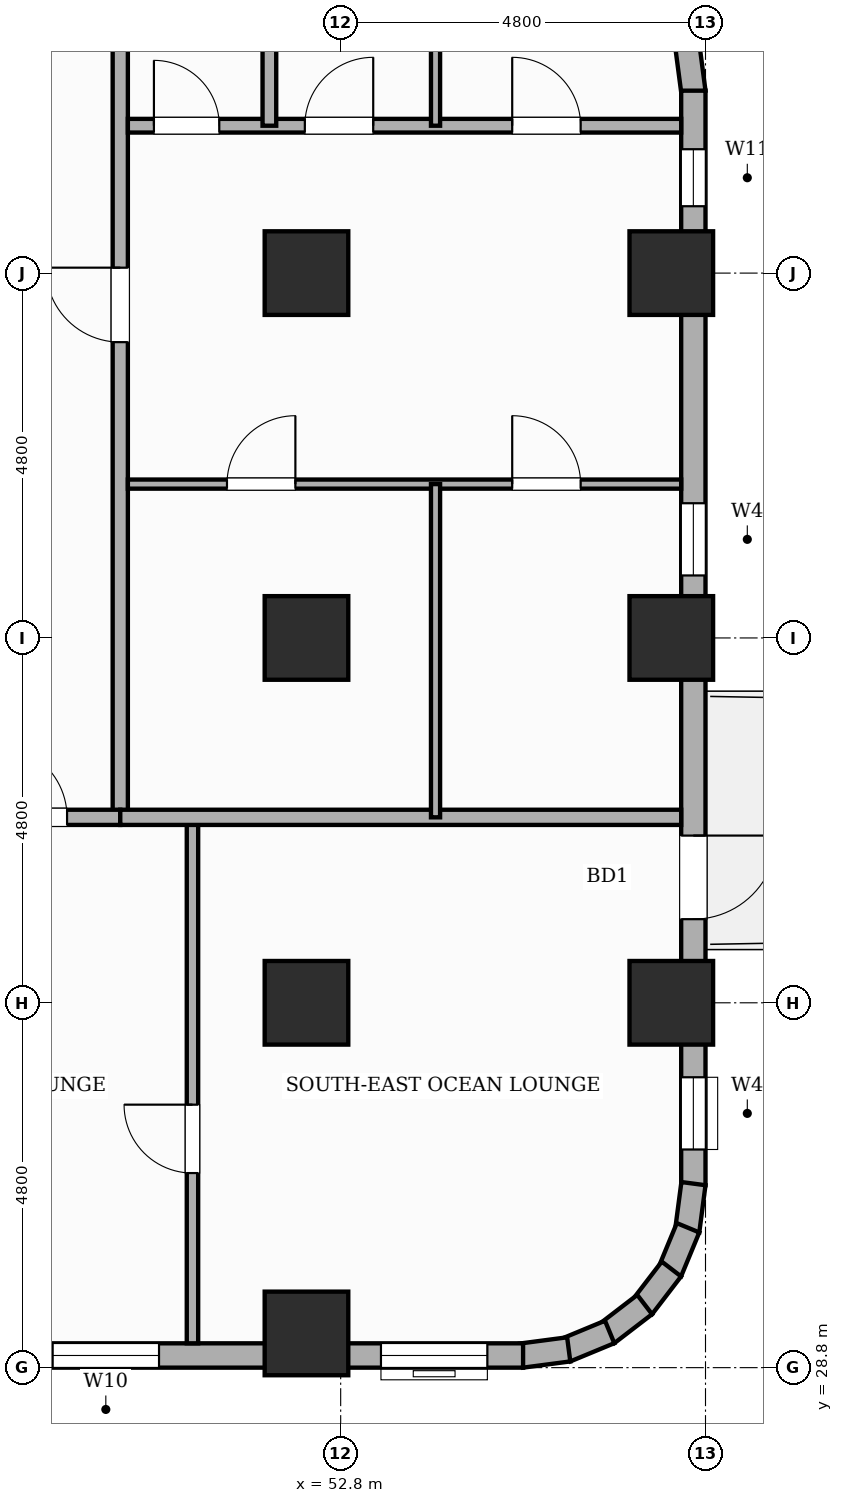
"""IFC4 building model, lengths in metres.
Left out: names, types, materials, properties, quantities, classifications, styles, units other than length and angle.
Written with IfcOpenShell. Run it as: python <this file> out.ifc"""

import sys

from ifc_helpers import new_model, si_unit, direction, frame, frame_2d, origin, origin_2d, place, context, subcontext, project, spatial, rectangle, extrude, element, fill, save


model = new_model("IFC4")
c1 = context("Model", 3, precision=1e-05, world=origin(), true_north=direction((0.0, 1.0)))
c2 = subcontext(c1, "Body", "Model", "MODEL_VIEW")
j1 = project(units=[si_unit("LENGTHUNIT", "METRE"), si_unit("PLANEANGLEUNIT", "RADIAN")], contexts=[c1])
p1 = place(None, origin())
s1 = spatial("IfcSite", under=j1, at=p1, CompositionType="ELEMENT")
p2 = place(p1, origin())
s2 = spatial("IfcBuilding", under=s1, at=p2, CompositionType="ELEMENT")
p3 = place(p2, frame((0.0, 0.0, 46.6)))
s3 = spatial("IfcBuildingStorey", under=s2, at=p3, CompositionType="ELEMENT", Elevation=46.6)
for number, where, z_axis, x_axis in (
    (1, (52.35, 29.25, 0.0), (0.0, 0.0, 1.0), (1.0, 0.0, 0.0)),
    (2, (52.35, 33.6, 0.0), (0.0, 0.0, 1.0), (1.0, 0.0, 0.0)),
    (3, (52.35, 38.4, 0.0), (0.0, 0.0, 1.0), (1.0, 0.0, 0.0)),
    (4, (52.35, 43.2, 0.0), (0.0, 0.0, 1.0), (1.0, 0.0, 0.0)),
    (5, (57.15, 33.6, 0.0), (0.0, 0.0, 1.0), (1.0, 0.0, 0.0)),
    (6, (57.15, 38.4, 0.0), (0.0, 0.0, 1.0), (1.0, 0.0, 0.0)),
    (7, (57.15, 43.2, 0.0), (0.0, 0.0, 1.0), (1.0, 0.0, 0.0)),
):
    element("IfcColumn", number, at=place(p3, frame(where, z_axis=z_axis, x_axis=x_axis)), inside=s3, PredefinedType="COLUMN", context=c2, shape_type="SweptSolid", body=[
        extrude(rectangle(XDim=1.1, YDim=1.1, at=origin_2d()), origin(), (0.0, 0.0, 1.0), 3.6),
    ])
for number, where, z_axis, x_axis in (
    (8, (57.131, 46.739, 0.0), (0.0, 0.0, 1.0), (0.383, -0.924, 0.0)),
    (9, (57.36, 46.2, 0.0), (0.0, 0.0, 1.0), (0.131, -0.991, 0.0)),
):
    element("IfcWall", number, at=place(p3, frame(where, z_axis=z_axis, x_axis=x_axis)), inside=s3, PredefinedType="STANDARD", context=c2, shape_type="SweptSolid", body=[
        extrude(rectangle(XDim=0.626, YDim=0.32, at=frame_2d((0.313, 0.0))), origin(), (0.0, 0.0, 1.0), 3.35),
    ])
p4 = place(p3, frame((57.44, 45.6, 0.0), z_axis=(0.0, 0.0, 1.0), x_axis=(0.0, -1.0, 0.0)))
e10 = element("IfcWall", 10, at=p4, inside=s3, PredefinedType="STANDARD", context=c2, shape_type="SweptSolid", body=[
    extrude(rectangle(XDim=14.4, YDim=0.32, at=frame_2d((7.2, 0.0))), origin(), (0.0, 0.0, 1.0), 2.53),
])
p5 = place(p4, frame((9.8, 0.0, 0.0)))
e11 = element("IfcOpeningElement", 11, at=p5, cuts=e10, PredefinedType="OPENING", context=c2, shape_type="SweptSolid", body=[
    extrude(rectangle(XDim=1.1, YDim=2.15, at=frame_2d((0.55, 1.075))), frame((0.0, 0.17, 0.0), z_axis=(0.0, -1.0, 0.0), x_axis=(1.0, 0.0, 0.0)), (0.0, 0.0, 1.0), 0.34),
])
p6 = place(p4, frame((5.428, 0.0, 0.45)))
e12 = element("IfcOpeningElement", 12, at=p6, cuts=e10, PredefinedType="OPENING", context=c2, shape_type="SweptSolid", body=[
    extrude(rectangle(XDim=0.95, YDim=1.8, at=frame_2d((0.475, 0.9))), frame((0.0, 0.17, 0.0), z_axis=(0.0, -1.0, 0.0), x_axis=(1.0, 0.0, 0.0)), (0.0, 0.0, 1.0), 0.34),
])
p7 = place(p4, frame((12.98, 0.0, 0.45)))
e13 = element("IfcOpeningElement", 13, at=p7, cuts=e10, PredefinedType="OPENING", context=c2, shape_type="SweptSolid", body=[
    extrude(rectangle(XDim=0.95, YDim=1.8, at=frame_2d((0.475, 0.9))), frame((0.0, 0.17, 0.0), z_axis=(0.0, -1.0, 0.0), x_axis=(1.0, 0.0, 0.0)), (0.0, 0.0, 1.0), 0.34),
])
p8 = place(p4, frame((0.771, 0.0, 0.45)))
e14 = element("IfcOpeningElement", 14, at=p8, cuts=e10, PredefinedType="OPENING", context=c2, shape_type="SweptSolid", body=[
    extrude(rectangle(XDim=0.75, YDim=1.8, at=frame_2d((0.375, 0.9))), frame((0.0, 0.17, 0.0), z_axis=(0.0, -1.0, 0.0), x_axis=(1.0, 0.0, 0.0)), (0.0, 0.0, 1.0), 0.34),
])
p9 = place(p3, frame((57.441, 31.221, 0.0), z_axis=(0.0, 0.0, 1.0), x_axis=(-0.130504898859, -0.991447664465, 0.0)))
e15 = element("IfcWall", 15, at=p9, inside=s3, PredefinedType="STANDARD", context=c2, shape_type="SweptSolid", body=[
    extrude(rectangle(XDim=0.627, YDim=0.32, at=frame_2d((0.313, 0.0))), origin(), (0.0, 0.0, 1.0), 3.35),
])
p10 = place(p3, frame((57.37, 30.64, 0.0), z_axis=(0.0, 0.0, 1.0), x_axis=(-0.382787856107, -0.923836271867, 0.0)))
e16 = element("IfcWall", 16, at=p10, inside=s3, PredefinedType="STANDARD", context=c2, shape_type="SweptSolid", body=[
    extrude(rectangle(XDim=0.626, YDim=0.32, at=frame_2d((0.313, 0.0))), origin(), (0.0, 0.0, 1.0), 3.35),
])
p11 = place(p3, frame((57.152, 30.097, 0.0), z_axis=(0.0, 0.0, 1.0), x_axis=(-0.608693302629, -0.793405610854, 0.0)))
e17 = element("IfcWall", 17, at=p11, inside=s3, PredefinedType="STANDARD", context=c2, shape_type="SweptSolid", body=[
    extrude(rectangle(XDim=0.626, YDim=0.32, at=frame_2d((0.313, 0.0))), origin(), (0.0, 0.0, 1.0), 3.35),
])
p12 = place(p3, frame((56.8, 29.63, 0.0), z_axis=(0.0, 0.0, 1.0), x_axis=(-0.793361818833, -0.608750379399, 0.0)))
e18 = element("IfcWall", 18, at=p12, inside=s3, PredefinedType="STANDARD", context=c2, shape_type="SweptSolid", body=[
    extrude(rectangle(XDim=0.627, YDim=0.32, at=frame_2d((0.313, 0.0))), origin(), (0.0, 0.0, 1.0), 3.35),
])
for number, where, z_axis, x_axis in (
    (19, (56.339, 29.269, 0.0), (0.0, 0.0, 1.0), (-0.924, -0.383, 0.0)),
    (20, (55.8, 29.04, 0.0), (0.0, 0.0, 1.0), (-0.991, -0.131, 0.0)),
):
    element("IfcWall", number, at=place(p3, frame(where, z_axis=z_axis, x_axis=x_axis)), inside=s3, PredefinedType="STANDARD", context=c2, shape_type="SweptSolid", body=[
        extrude(rectangle(XDim=0.626, YDim=0.32, at=frame_2d((0.313, 0.0))), origin(), (0.0, 0.0, 1.0), 3.35),
    ])
p13 = place(p3, frame((55.2, 28.96, 0.0), z_axis=(0.0, 0.0, 1.0), x_axis=(-1.0, 0.0, 0.0)))
e21 = element("IfcWall", 21, at=p13, inside=s3, PredefinedType="STANDARD", context=c2, shape_type="SweptSolid", body=[
    extrude(rectangle(XDim=28.8, YDim=0.32, at=frame_2d((14.4, 0.0))), origin(), (0.0, 0.0, 1.0), 2.53),
])
p14 = place(p13, frame((27.38, 0.0, 0.45)))
e22 = element("IfcOpeningElement", 22, at=p14, cuts=e21, PredefinedType="OPENING", context=c2, shape_type="SweptSolid", body=[
    extrude(rectangle(XDim=0.95, YDim=1.8, at=frame_2d((0.475, 0.9))), frame((0.0, 0.17, 0.0), z_axis=(0.0, -1.0, 0.0), x_axis=(1.0, 0.0, 0.0)), (0.0, 0.0, 1.0), 0.34),
])
p15 = place(p13, frame((18.815, 0.0, 0.65)))
e23 = element("IfcOpeningElement", 23, at=p15, cuts=e21, PredefinedType="OPENING", context=c2, shape_type="SweptSolid", body=[
    extrude(rectangle(XDim=1.4, YDim=1.1, at=frame_2d((0.7, 0.55))), frame((0.0, 0.17, 0.0), z_axis=(0.0, -1.0, 0.0), x_axis=(1.0, 0.0, 0.0)), (0.0, 0.0, 1.0), 0.34),
])
p16 = place(p13, frame((14.604, 0.0, 0.65)))
e24 = element("IfcOpeningElement", 24, at=p16, cuts=e21, PredefinedType="OPENING", context=c2, shape_type="SweptSolid", body=[
    extrude(rectangle(XDim=1.4, YDim=1.1, at=frame_2d((0.7, 0.55))), frame((0.0, 0.17, 0.0), z_axis=(0.0, -1.0, 0.0), x_axis=(1.0, 0.0, 0.0)), (0.0, 0.0, 1.0), 0.34),
])
p17 = place(p13, frame((4.79, 0.0, 0.65)))
e25 = element("IfcOpeningElement", 25, at=p17, cuts=e21, PredefinedType="OPENING", context=c2, shape_type="SweptSolid", body=[
    extrude(rectangle(XDim=1.4, YDim=1.1, at=frame_2d((0.7, 0.55))), frame((0.0, 0.17, 0.0), z_axis=(0.0, -1.0, 0.0), x_axis=(1.0, 0.0, 0.0)), (0.0, 0.0, 1.0), 0.34),
])
p18 = place(p13, frame((0.47, 0.0, 0.65)))
e26 = element("IfcOpeningElement", 26, at=p18, cuts=e21, PredefinedType="OPENING", context=c2, shape_type="SweptSolid", body=[
    extrude(rectangle(XDim=1.4, YDim=1.1, at=frame_2d((0.7, 0.55))), frame((0.0, 0.17, 0.0), z_axis=(0.0, -1.0, 0.0), x_axis=(1.0, 0.0, 0.0)), (0.0, 0.0, 1.0), 0.34),
])
p19 = place(p13, frame((23.76, 0.0, 0.65)))
e27 = element("IfcOpeningElement", 27, at=p19, cuts=e21, PredefinedType="OPENING", context=c2, shape_type="SweptSolid", body=[
    extrude(rectangle(XDim=1.4, YDim=1.1, at=frame_2d((0.7, 0.55))), frame((0.0, 0.17, 0.0), z_axis=(0.0, -1.0, 0.0), x_axis=(1.0, 0.0, 0.0)), (0.0, 0.0, 1.0), 0.34),
])
p20 = place(p13, frame((12.999, 0.0, 0.45)))
e28 = element("IfcOpeningElement", 28, at=p20, cuts=e21, PredefinedType="OPENING", context=c2, shape_type="SweptSolid", body=[
    extrude(rectangle(XDim=0.95, YDim=1.8, at=frame_2d((0.475, 0.9))), frame((0.0, 0.17, 0.0), z_axis=(0.0, -1.0, 0.0), x_axis=(1.0, 0.0, 0.0)), (0.0, 0.0, 1.0), 0.34),
])
p21 = place(p3, frame((49.9, 36.04, 0.0), z_axis=(0.0, 0.0, 1.0), x_axis=(0.0, 1.0, 0.0)))
e29 = element("IfcWall", 29, at=p21, inside=s3, PredefinedType="PARTITIONING", context=c2, shape_type="SweptSolid", body=[
    extrude(rectangle(XDim=11.64, YDim=0.2, at=frame_2d((5.82, 0.0))), origin(), (0.0, 0.0, 1.0), 3.35),
])
p22 = place(p21, frame((6.251, 0.0, 0.0)))
e30 = element("IfcOpeningElement", 30, at=p22, cuts=e29, PredefinedType="OPENING", context=c2, shape_type="SweptSolid", body=[
    extrude(rectangle(XDim=0.98, YDim=2.18, at=frame_2d((0.49, 1.09))), frame((0.0, 0.11, 0.0), z_axis=(0.0, -1.0, 0.0), x_axis=(1.0, 0.0, 0.0)), (0.0, 0.0, 1.0), 0.22),
])
p23 = place(p3, frame((47.6, 36.04, 0.0), z_axis=(0.0, 0.0, 1.0), x_axis=(1.0, 0.0, 0.0)))
e31 = element("IfcWall", 31, at=p23, inside=s3, PredefinedType="PARTITIONING", context=c2, shape_type="SweptSolid", body=[
    extrude(rectangle(XDim=2.3, YDim=0.2, at=frame_2d((1.15, 0.0))), origin(), (0.0, 0.0, 1.0), 3.35),
])
p24 = place(p23, frame((0.65, 0.0, 0.0)))
e32 = element("IfcOpeningElement", 32, at=p24, cuts=e31, PredefinedType="OPENING", context=c2, shape_type="SweptSolid", body=[
    extrude(rectangle(XDim=0.95, YDim=2.15, at=frame_2d((0.475, 1.075))), frame((0.0, 0.11, 0.0), z_axis=(0.0, -1.0, 0.0), x_axis=(1.0, 0.0, 0.0)), (0.0, 0.0, 1.0), 0.22),
])
p25 = place(p3, frame((50.85, 29.12, 0.0), z_axis=(0.0, 0.0, 1.0), x_axis=(0.0, 1.0, 0.0)))
e33 = element("IfcWall", 33, at=p25, inside=s3, PredefinedType="PARTITIONING", context=c2, shape_type="SweptSolid", body=[
    extrude(rectangle(XDim=6.92, YDim=0.15, at=frame_2d((3.46, 0.0))), origin(), (0.0, 0.0, 1.0), 3.35),
])
p26 = place(p25, frame((2.24, 0.0, 0.0)))
e34 = element("IfcOpeningElement", 34, at=p26, cuts=e33, PredefinedType="OPENING", context=c2, shape_type="SweptSolid", body=[
    extrude(rectangle(XDim=0.9, YDim=2.15, at=frame_2d((0.45, 1.075))), frame((0.0, 0.085, 0.0), z_axis=(0.0, -1.0, 0.0), x_axis=(1.0, 0.0, 0.0)), (0.0, 0.0, 1.0), 0.17),
])
p27 = place(p3, frame((49.9, 36.04, 0.0), z_axis=(0.0, 0.0, 1.0), x_axis=(1.0, 0.0, 0.0)))
e35 = element("IfcWall", 35, at=p27, inside=s3, PredefinedType="SOLIDWALL", context=c2, shape_type="SweptSolid", body=[
    extrude(rectangle(XDim=7.38, YDim=0.2, at=frame_2d((3.69, 0.0))), origin(), (0.0, 0.0, 1.0), 3.35),
])
p28 = place(p3, frame((50.0, 45.139, 0.0), z_axis=(0.0, 0.0, 1.0), x_axis=(1.0, 0.0, 0.0)))
e36 = element("IfcWall", 36, at=p28, inside=s3, PredefinedType="PLUMBINGWALL", context=c2, shape_type="SweptSolid", body=[
    extrude(rectangle(XDim=7.28, YDim=0.18, at=frame_2d((3.64, 0.0))), origin(), (0.0, 0.0, 1.0), 3.35),
])
p29 = place(p28, frame((0.343, 0.0, 0.0)))
e37 = element("IfcOpeningElement", 37, at=p29, cuts=e36, PredefinedType="OPENING", context=c2, shape_type="SweptSolid", body=[
    extrude(rectangle(XDim=0.86, YDim=2.1, at=frame_2d((0.43, 1.05))), frame((0.0, 0.1, 0.0), z_axis=(0.0, -1.0, 0.0), x_axis=(1.0, 0.0, 0.0)), (0.0, 0.0, 1.0), 0.2),
])
p30 = place(p28, frame((2.328, 0.0, 0.0)))
e38 = element("IfcOpeningElement", 38, at=p30, cuts=e36, PredefinedType="OPENING", context=c2, shape_type="SweptSolid", body=[
    extrude(rectangle(XDim=0.9, YDim=2.15, at=frame_2d((0.45, 1.075))), frame((0.0, 0.1, 0.0), z_axis=(0.0, -1.0, 0.0), x_axis=(1.0, 0.0, 0.0)), (0.0, 0.0, 1.0), 0.2),
])
p31 = place(p28, frame((5.057, 0.0, 0.0)))
e39 = element("IfcOpeningElement", 39, at=p31, cuts=e36, PredefinedType="OPENING", context=c2, shape_type="SweptSolid", body=[
    extrude(rectangle(XDim=0.9, YDim=2.15, at=frame_2d((0.45, 1.075))), frame((0.0, 0.1, 0.0), z_axis=(0.0, -1.0, 0.0), x_axis=(1.0, 0.0, 0.0)), (0.0, 0.0, 1.0), 0.2),
])
p32 = place(p3, frame((50.0, 40.424, 0.0), z_axis=(0.0, 0.0, 1.0), x_axis=(1.0, 0.0, 0.0)))
e40 = element("IfcWall", 40, at=p32, inside=s3, PredefinedType="PARTITIONING", context=c2, shape_type="SweptSolid", body=[
    extrude(rectangle(XDim=7.28, YDim=0.12, at=frame_2d((3.64, 0.0))), origin(), (0.0, 0.0, 1.0), 3.35),
])
p33 = place(p32, frame((1.304, 0.0, 0.0)))
e41 = element("IfcOpeningElement", 41, at=p33, cuts=e40, PredefinedType="OPENING", context=c2, shape_type="SweptSolid", body=[
    extrude(rectangle(XDim=0.9, YDim=2.15, at=frame_2d((0.45, 1.075))), frame((0.0, 0.07, 0.0), z_axis=(0.0, -1.0, 0.0), x_axis=(1.0, 0.0, 0.0)), (0.0, 0.0, 1.0), 0.14),
])
p34 = place(p32, frame((5.057, 0.0, 0.0)))
e42 = element("IfcOpeningElement", 42, at=p34, cuts=e40, PredefinedType="OPENING", context=c2, shape_type="SweptSolid", body=[
    extrude(rectangle(XDim=0.9, YDim=2.15, at=frame_2d((0.45, 1.075))), frame((0.0, 0.07, 0.0), z_axis=(0.0, -1.0, 0.0), x_axis=(1.0, 0.0, 0.0)), (0.0, 0.0, 1.0), 0.14),
])
p35 = place(p3, frame((54.048, 36.04, 0.0), z_axis=(0.0, 0.0, 1.0), x_axis=(0.0, 1.0, 0.0)))
e43 = element("IfcWall", 43, at=p35, inside=s3, PredefinedType="PARTITIONING", context=c2, shape_type="SweptSolid", body=[
    extrude(rectangle(XDim=4.384, YDim=0.12, at=frame_2d((2.192, 0.0))), origin(), (0.0, 0.0, 1.0), 3.35),
])
p36 = place(p3, frame((51.862, 45.139, 0.0), z_axis=(0.0, 0.0, 1.0), x_axis=(0.0, 1.0, 0.0)))
e44 = element("IfcWall", 44, at=p36, inside=s3, PredefinedType="PLUMBINGWALL", context=c2, shape_type="SweptSolid", body=[
    extrude(rectangle(XDim=2.541, YDim=0.18, at=frame_2d((1.271, 0.0))), origin(), (0.0, 0.0, 1.0), 3.35),
])
p37 = place(p3, frame((54.048, 45.139, 0.0), z_axis=(0.0, 0.0, 1.0), x_axis=(0.0, 1.0, 0.0)))
e45 = element("IfcWall", 45, at=p37, inside=s3, PredefinedType="PARTITIONING", context=c2, shape_type="SweptSolid", body=[
    extrude(rectangle(XDim=2.541, YDim=0.12, at=frame_2d((1.271, 0.0))), origin(), (0.0, 0.0, 1.0), 3.35),
])
p38 = place(p5, origin())
e46 = element("IfcDoor", 46, at=p38, inside=s3, OperationType="SINGLE_SWING_LEFT", PredefinedType="DOOR", context=c2, shape_type="SweptSolid", body=[
    extrude(rectangle(XDim=1.1, YDim=2.15, at=frame_2d((0.55, 1.075))), frame((0.0, 0.025, 0.0), z_axis=(0.0, -1.0, 0.0), x_axis=(1.0, 0.0, 0.0)), (0.0, 0.0, 1.0), 0.05),
])
fill(e11, e46)
p39 = place(p6, origin())
e47 = element("IfcWindow", 47, at=p39, inside=s3, PartitioningType="SINGLE_PANEL", PredefinedType="WINDOW", context=c2, shape_type="SweptSolid", body=[
    extrude(rectangle(XDim=0.95, YDim=1.8, at=frame_2d((0.475, 0.9))), frame((0.0, 0.03, 0.0), z_axis=(0.0, -1.0, 0.0), x_axis=(1.0, 0.0, 0.0)), (0.0, 0.0, 1.0), 0.06),
])
fill(e12, e47)
p40 = place(p7, origin())
e48 = element("IfcWindow", 48, at=p40, inside=s3, PartitioningType="SINGLE_PANEL", PredefinedType="WINDOW", context=c2, shape_type="SweptSolid", body=[
    extrude(rectangle(XDim=0.95, YDim=1.8, at=frame_2d((0.475, 0.9))), frame((0.0, 0.03, 0.0), z_axis=(0.0, -1.0, 0.0), x_axis=(1.0, 0.0, 0.0)), (0.0, 0.0, 1.0), 0.06),
])
fill(e13, e48)
p41 = place(p8, origin())
e49 = element("IfcWindow", 49, at=p41, inside=s3, PartitioningType="SINGLE_PANEL", PredefinedType="WINDOW", context=c2, shape_type="SweptSolid", body=[
    extrude(rectangle(XDim=0.75, YDim=1.8, at=frame_2d((0.375, 0.9))), frame((0.0, 0.03, 0.0), z_axis=(0.0, -1.0, 0.0), x_axis=(1.0, 0.0, 0.0)), (0.0, 0.0, 1.0), 0.06),
])
fill(e14, e49)
p42 = place(p17, origin())
e50 = element("IfcWindow", 50, at=p42, inside=s3, PartitioningType="SINGLE_PANEL", PredefinedType="WINDOW", context=c2, shape_type="SweptSolid", body=[
    extrude(rectangle(XDim=1.4, YDim=1.1, at=frame_2d((0.7, 0.55))), frame((0.0, 0.03, 0.0), z_axis=(0.0, -1.0, 0.0), x_axis=(1.0, 0.0, 0.0)), (0.0, 0.0, 1.0), 0.06),
])
fill(e25, e50)
p43 = place(p18, origin())
e51 = element("IfcWindow", 51, at=p43, inside=s3, PartitioningType="SINGLE_PANEL", PredefinedType="WINDOW", context=c2, shape_type="SweptSolid", body=[
    extrude(rectangle(XDim=1.4, YDim=1.1, at=frame_2d((0.7, 0.55))), frame((0.0, 0.03, 0.0), z_axis=(0.0, -1.0, 0.0), x_axis=(1.0, 0.0, 0.0)), (0.0, 0.0, 1.0), 0.06),
])
fill(e26, e51)
p44 = place(p24, origin())
e52 = element("IfcDoor", 52, at=p44, inside=s3, OperationType="SINGLE_SWING_LEFT", PredefinedType="DOOR", context=c2, shape_type="SweptSolid", body=[
    extrude(rectangle(XDim=0.95, YDim=2.15, at=frame_2d((0.475, 1.075))), frame((0.0, 0.025, 0.0), z_axis=(0.0, -1.0, 0.0), x_axis=(1.0, 0.0, 0.0)), (0.0, 0.0, 1.0), 0.05),
])
fill(e32, e52)
p45 = place(p26, origin())
e53 = element("IfcDoor", 53, at=p45, inside=s3, OperationType="SINGLE_SWING_RIGHT", PredefinedType="DOOR", context=c2, shape_type="SweptSolid", body=[
    extrude(rectangle(XDim=0.9, YDim=2.15, at=frame_2d((0.45, 1.075))), frame((0.0, 0.025, 0.0), z_axis=(0.0, -1.0, 0.0), x_axis=(1.0, 0.0, 0.0)), (0.0, 0.0, 1.0), 0.05),
])
fill(e34, e53)
p46 = place(p22, origin())
e54 = element("IfcDoor", 54, at=p46, inside=s3, OperationType="SINGLE_SWING_RIGHT", PredefinedType="DOOR", context=c2, shape_type="SweptSolid", body=[
    extrude(rectangle(XDim=0.98, YDim=2.18, at=frame_2d((0.49, 1.09))), frame((0.0, 0.025, 0.0), z_axis=(0.0, -1.0, 0.0), x_axis=(1.0, 0.0, 0.0)), (0.0, 0.0, 1.0), 0.05),
])
fill(e30, e54)
p47 = place(p33, origin())
e55 = element("IfcDoor", 55, at=p47, inside=s3, OperationType="SINGLE_SWING_RIGHT", PredefinedType="DOOR", context=c2, shape_type="SweptSolid", body=[
    extrude(rectangle(XDim=0.9, YDim=2.15, at=frame_2d((0.45, 1.075))), frame((0.0, 0.025, 0.0), z_axis=(0.0, -1.0, 0.0), x_axis=(1.0, 0.0, 0.0)), (0.0, 0.0, 1.0), 0.05),
])
fill(e41, e55)
p48 = place(p34, origin())
e56 = element("IfcDoor", 56, at=p48, inside=s3, OperationType="SINGLE_SWING_LEFT", PredefinedType="DOOR", context=c2, shape_type="SweptSolid", body=[
    extrude(rectangle(XDim=0.9, YDim=2.15, at=frame_2d((0.45, 1.075))), frame((0.0, 0.025, 0.0), z_axis=(0.0, -1.0, 0.0), x_axis=(1.0, 0.0, 0.0)), (0.0, 0.0, 1.0), 0.05),
])
fill(e42, e56)
p49 = place(p29, origin())
e57 = element("IfcDoor", 57, at=p49, inside=s3, OperationType="SINGLE_SWING_LEFT", PredefinedType="DOOR", context=c2, shape_type="SweptSolid", body=[
    extrude(rectangle(XDim=0.86, YDim=2.1, at=frame_2d((0.43, 1.05))), frame((0.0, 0.025, 0.0), z_axis=(0.0, -1.0, 0.0), x_axis=(1.0, 0.0, 0.0)), (0.0, 0.0, 1.0), 0.05),
])
fill(e37, e57)
p50 = place(p30, origin())
e58 = element("IfcDoor", 58, at=p50, inside=s3, OperationType="SINGLE_SWING_RIGHT", PredefinedType="DOOR", context=c2, shape_type="SweptSolid", body=[
    extrude(rectangle(XDim=0.9, YDim=2.15, at=frame_2d((0.45, 1.075))), frame((0.0, 0.025, 0.0), z_axis=(0.0, -1.0, 0.0), x_axis=(1.0, 0.0, 0.0)), (0.0, 0.0, 1.0), 0.05),
])
fill(e38, e58)
p51 = place(p31, origin())
e59 = element("IfcDoor", 59, at=p51, inside=s3, OperationType="SINGLE_SWING_LEFT", PredefinedType="DOOR", context=c2, shape_type="SweptSolid", body=[
    extrude(rectangle(XDim=0.9, YDim=2.15, at=frame_2d((0.45, 1.075))), frame((0.0, 0.025, 0.0), z_axis=(0.0, -1.0, 0.0), x_axis=(1.0, 0.0, 0.0)), (0.0, 0.0, 1.0), 0.05),
])
fill(e39, e59)
save(model, sys.argv[1])
